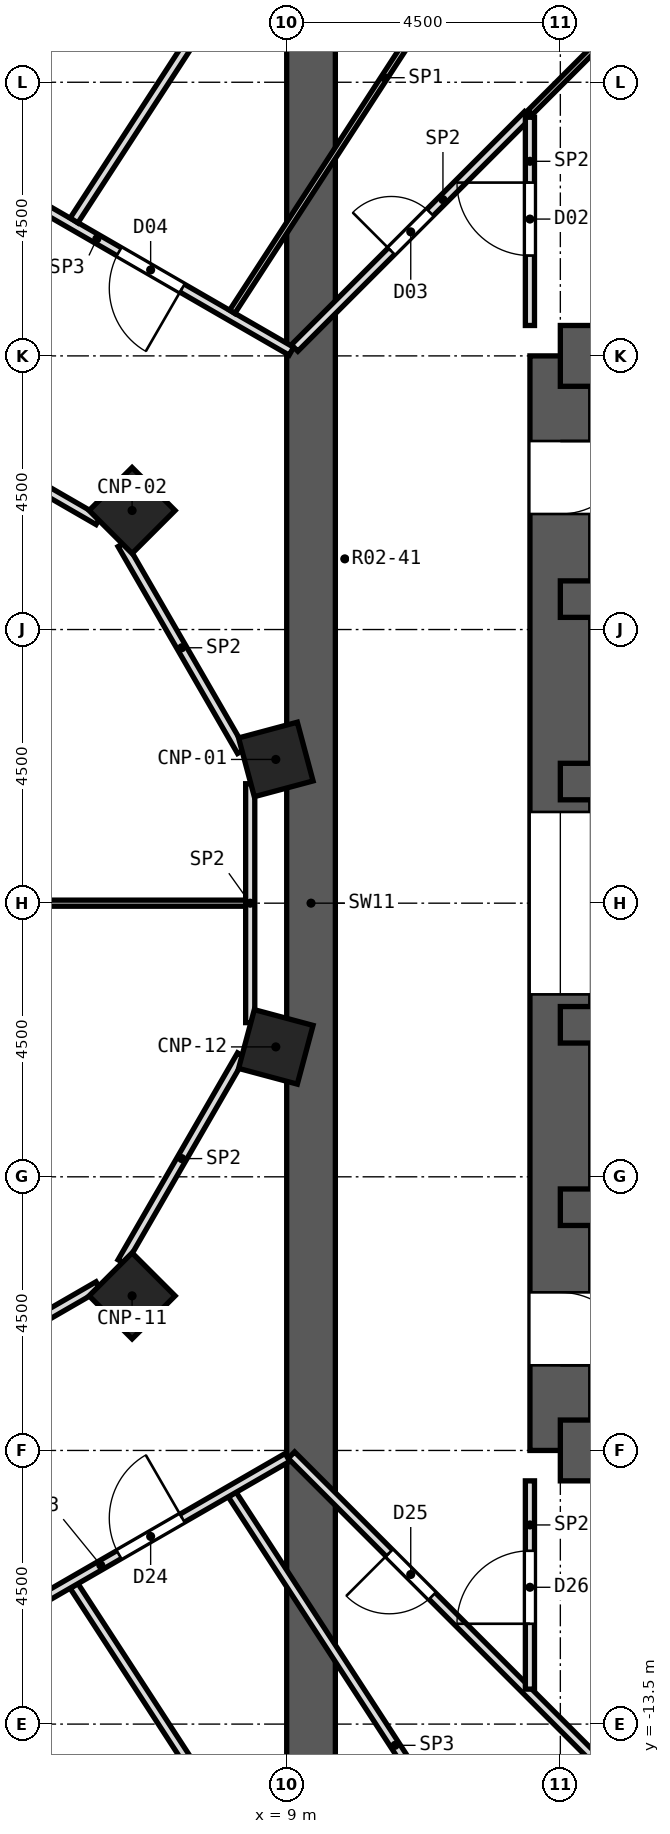
"""IFC4 building model, lengths in metres.
Left out: names, types, materials, properties, quantities, classifications, styles, units other than length and angle.
Written with IfcOpenShell. Run it as: python <this file> out.ifc"""

import sys

from ifc_helpers import new_model, si_unit, direction, frame, frame_2d, origin, origin_2d, place, context, subcontext, project, spatial, rectangle, extrude, element, fill, save


model = new_model("IFC4")
c1 = context("Model", 3, precision=1e-05, world=origin(), true_north=direction((0.0, 1.0)))
c2 = subcontext(c1, "Body", "Model", "MODEL_VIEW")
j1 = project(units=[si_unit("LENGTHUNIT", "METRE"), si_unit("PLANEANGLEUNIT", "RADIAN")], contexts=[c1])
p1 = place(None, origin())
s1 = spatial("IfcSite", under=j1, at=p1, CompositionType="ELEMENT")
p2 = place(p1, origin())
s2 = spatial("IfcBuilding", under=s1, at=p2, CompositionType="ELEMENT")
p3 = place(p2, frame((0.0, 0.0, -4.5)))
s3 = spatial("IfcBuildingStorey", under=s2, at=p3, CompositionType="ELEMENT", Elevation=-4.5)
for number, where, z_axis, x_axis in (
    (1, (8.821, 2.364, 0.0), (0.0, 0.0, 1.0), (0.966, 0.259, 0.0)),
    (2, (6.458, 6.458, 0.0), (0.0, 0.0, 1.0), (0.707, 0.707, 0.0)),
    (3, (6.458, -6.458, 0.0), (0.0, 0.0, 1.0), (0.707, -0.707, 0.0)),
    (4, (8.821, -2.364, 0.0), (0.0, 0.0, 1.0), (0.966, -0.259, 0.0)),
):
    element("IfcColumn", number, at=place(p3, frame(where, z_axis=z_axis, x_axis=x_axis)), inside=s3, PredefinedType="COLUMN", context=c2, shape_type="SweptSolid", body=[
        extrude(rectangle(XDim=1.0, YDim=1.0, at=origin_2d()), origin(), (0.0, 0.0, 1.0), 4.5),
    ])
p4 = place(p3, frame((13.5, -9.0, 0.0), z_axis=(0.0, 0.0, 1.0), x_axis=(0.0, 1.0, 0.0)))
e5 = element("IfcWall", 5, at=p4, inside=s3, PredefinedType="SHEAR", context=c2, shape_type="SweptSolid", body=[
    extrude(rectangle(XDim=18.0, YDim=1.0, at=frame_2d((9.0, 0.0))), origin(), (0.0, 0.0, 1.0), 4.5),
])
p5 = place(p4, frame((15.4, 0.0, 0.0)))
e6 = element("IfcOpeningElement", 6, at=p5, cuts=e5, PredefinedType="OPENING", context=c2, shape_type="SweptSolid", body=[
    extrude(rectangle(XDim=1.2, YDim=2.1, at=frame_2d((0.6, 1.05))), frame((0.0, 0.512, 0.0), z_axis=(0.0, -1.0, 0.0), x_axis=(1.0, 0.0, 0.0)), (0.0, 0.0, 1.0), 1.024),
])
p6 = place(p4, frame((1.4, 0.0, 0.0)))
e7 = element("IfcOpeningElement", 7, at=p6, cuts=e5, PredefinedType="OPENING", context=c2, shape_type="SweptSolid", body=[
    extrude(rectangle(XDim=1.2, YDim=2.1, at=frame_2d((0.6, 1.05))), frame((0.0, 0.512, 0.0), z_axis=(0.0, -1.0, 0.0), x_axis=(1.0, 0.0, 0.0)), (0.0, 0.0, 1.0), 1.024),
])
p7 = place(p4, frame((7.5, 0.0, 0.0)))
e8 = element("IfcOpeningElement", 8, at=p7, cuts=e5, PredefinedType="OPENING", context=c2, shape_type="SweptSolid", body=[
    extrude(rectangle(XDim=3.0, YDim=2.4, at=frame_2d((1.5, 1.2))), frame((0.0, 0.512, 0.0), z_axis=(0.0, -1.0, 0.0), x_axis=(1.0, 0.0, 0.0)), (0.0, 0.0, 1.0), 1.024),
])
for number, where, z_axis, x_axis in (
    (9, (13.5, 9.0, 0.0), (0.0, 0.0, 1.0), (1.0, 0.0, 0.0)),
    (10, (13.5, -9.0, 0.0), (0.0, 0.0, 1.0), (1.0, 0.0, 0.0)),
):
    element("IfcWall", number, at=place(p3, frame(where, z_axis=z_axis, x_axis=x_axis)), inside=s3, PredefinedType="SHEAR", context=c2, shape_type="SweptSolid", body=[
        extrude(rectangle(XDim=12.4, YDim=1.0, at=frame_2d((6.2, 0.0))), origin(), (0.0, 0.0, 1.0), 4.5),
    ])
p8 = place(p3, frame((13.5, 5.0, 0.0), z_axis=(0.0, 0.0, 1.0), x_axis=(1.0, 0.0, 0.0)))
e11 = element("IfcWall", 11, at=p8, inside=s3, PredefinedType="SHEAR", context=c2, shape_type="SweptSolid", body=[
    extrude(rectangle(XDim=12.4, YDim=0.6, at=frame_2d((6.2, 0.0))), origin(), (0.0, 0.0, 1.0), 4.5),
])
p9 = place(p8, frame((10.31, 0.0, 0.0)))
e12 = element("IfcOpeningElement", 12, at=p9, cuts=e11, PredefinedType="OPENING", context=c2, shape_type="SweptSolid", body=[
    extrude(rectangle(XDim=0.9, YDim=2.1, at=frame_2d((0.45, 1.05))), frame((0.0, 0.312, 0.0), z_axis=(0.0, -1.0, 0.0), x_axis=(1.0, 0.0, 0.0)), (0.0, 0.0, 1.0), 0.624),
])
p10 = place(p3, frame((13.5, -5.0, 0.0), z_axis=(0.0, 0.0, 1.0), x_axis=(1.0, 0.0, 0.0)))
e13 = element("IfcWall", 13, at=p10, inside=s3, PredefinedType="SHEAR", context=c2, shape_type="SweptSolid", body=[
    extrude(rectangle(XDim=12.4, YDim=0.6, at=frame_2d((6.2, 0.0))), origin(), (0.0, 0.0, 1.0), 4.5),
])
p11 = place(p10, frame((10.716, 0.0, 0.0)))
e14 = element("IfcOpeningElement", 14, at=p11, cuts=e13, PredefinedType="OPENING", context=c2, shape_type="SweptSolid", body=[
    extrude(rectangle(XDim=0.9, YDim=2.1, at=frame_2d((0.45, 1.05))), frame((0.0, 0.312, 0.0), z_axis=(0.0, -1.0, 0.0), x_axis=(1.0, 0.0, 0.0)), (0.0, 0.0, 1.0), 0.624),
])
p12 = place(p10, frame((0.6, 0.0, 0.0)))
e15 = element("IfcOpeningElement", 15, at=p12, cuts=e13, PredefinedType="OPENING", context=c2, shape_type="SweptSolid", body=[
    extrude(rectangle(XDim=1.1, YDim=2.1, at=frame_2d((0.55, 1.05))), frame((0.0, 0.312, 0.0), z_axis=(0.0, -1.0, 0.0), x_axis=(1.0, 0.0, 0.0)), (0.0, 0.0, 1.0), 0.624),
])
p13 = place(p3, frame((13.5, 2.0, 0.0), z_axis=(0.0, 0.0, 1.0), x_axis=(1.0, 0.0, 0.0)))
e16 = element("IfcWall", 16, at=p13, inside=s3, PredefinedType="SHEAR", context=c2, shape_type="SweptSolid", body=[
    extrude(rectangle(XDim=12.4, YDim=0.6, at=frame_2d((6.2, 0.0))), origin(), (0.0, 0.0, 1.0), 4.5),
])
p14 = place(p13, frame((1.076, 0.0, 0.0)))
e17 = element("IfcOpeningElement", 17, at=p14, cuts=e16, PredefinedType="OPENING", context=c2, shape_type="SweptSolid", body=[
    extrude(rectangle(XDim=0.9, YDim=2.1, at=frame_2d((0.45, 1.05))), frame((0.0, 0.312, 0.0), z_axis=(0.0, -1.0, 0.0), x_axis=(1.0, 0.0, 0.0)), (0.0, 0.0, 1.0), 0.624),
])
p15 = place(p13, frame((3.196, 0.0, 0.0)))
e18 = element("IfcOpeningElement", 18, at=p15, cuts=e16, PredefinedType="OPENING", context=c2, shape_type="SweptSolid", body=[
    extrude(rectangle(XDim=0.9, YDim=2.1, at=frame_2d((0.45, 1.05))), frame((0.0, 0.312, 0.0), z_axis=(0.0, -1.0, 0.0), x_axis=(1.0, 0.0, 0.0)), (0.0, 0.0, 1.0), 0.624),
])
p16 = place(p13, frame((5.59, 0.0, 0.0)))
e19 = element("IfcOpeningElement", 19, at=p16, cuts=e16, PredefinedType="OPENING", context=c2, shape_type="SweptSolid", body=[
    extrude(rectangle(XDim=0.9, YDim=2.1, at=frame_2d((0.45, 1.05))), frame((0.0, 0.312, 0.0), z_axis=(0.0, -1.0, 0.0), x_axis=(1.0, 0.0, 0.0)), (0.0, 0.0, 1.0), 0.624),
])
p17 = place(p13, frame((10.31, 0.0, 0.0)))
e20 = element("IfcOpeningElement", 20, at=p17, cuts=e16, PredefinedType="OPENING", context=c2, shape_type="SweptSolid", body=[
    extrude(rectangle(XDim=0.9, YDim=2.1, at=frame_2d((0.45, 1.05))), frame((0.0, 0.312, 0.0), z_axis=(0.0, -1.0, 0.0), x_axis=(1.0, 0.0, 0.0)), (0.0, 0.0, 1.0), 0.624),
])
p18 = place(p3, frame((13.5, -2.0, 0.0), z_axis=(0.0, 0.0, 1.0), x_axis=(1.0, 0.0, 0.0)))
e21 = element("IfcWall", 21, at=p18, inside=s3, PredefinedType="SHEAR", context=c2, shape_type="SweptSolid", body=[
    extrude(rectangle(XDim=12.4, YDim=0.6, at=frame_2d((6.2, 0.0))), origin(), (0.0, 0.0, 1.0), 4.5),
])
p19 = place(p18, frame((1.265, 0.0, 0.0)))
e22 = element("IfcOpeningElement", 22, at=p19, cuts=e21, PredefinedType="OPENING", context=c2, shape_type="SweptSolid", body=[
    extrude(rectangle(XDim=1.0, YDim=2.1, at=frame_2d((0.5, 1.05))), frame((0.0, 0.312, 0.0), z_axis=(0.0, -1.0, 0.0), x_axis=(1.0, 0.0, 0.0)), (0.0, 0.0, 1.0), 0.624),
])
p20 = place(p18, frame((10.31, 0.0, 0.0)))
e23 = element("IfcOpeningElement", 23, at=p20, cuts=e21, PredefinedType="OPENING", context=c2, shape_type="SweptSolid", body=[
    extrude(rectangle(XDim=0.9, YDim=2.1, at=frame_2d((0.45, 1.05))), frame((0.0, 0.312, 0.0), z_axis=(0.0, -1.0, 0.0), x_axis=(1.0, 0.0, 0.0)), (0.0, 0.0, 1.0), 0.624),
])
p21 = place(p3, frame((9.4, -27.077, 0.0), z_axis=(0.0, 0.0, 1.0), x_axis=(0.0, 1.0, 0.0)))
e24 = element("IfcWall", 24, at=p21, inside=s3, PredefinedType="SHEAR", context=c2, shape_type="SweptSolid", body=[
    extrude(rectangle(XDim=54.154, YDim=0.8, at=frame_2d((27.077, 0.0))), origin(), (0.0, 0.0, 1.0), 4.5),
])
p22 = place(p3, frame((3.323, -12.4, 0.0), z_axis=(0.0, 0.0, 1.0), x_axis=(0.258774542154, -0.965937749719, 0.0)))
e25 = element("IfcWall", 25, at=p22, inside=s3, PredefinedType="PARTITIONING", context=c2, shape_type="SweptSolid", body=[
    extrude(rectangle(XDim=14.703, YDim=0.15, at=frame_2d((7.351, 0.0))), origin(), (0.0, 0.0, 1.0), 3.95),
])
p23 = place(p3, frame((6.292, 5.902, 0.0), z_axis=(0.0, 0.0, 1.0), x_axis=(0.500061252887, -0.865990036525, 0.0)))
e26 = element("IfcWall", 26, at=p23, inside=s3, PredefinedType="PARTITIONING", context=c2, shape_type="SweptSolid", body=[
    extrude(rectangle(XDim=3.93, YDim=0.15, at=frame_2d((1.965, 0.0))), origin(), (0.0, 0.0, 1.0), 3.95),
])
p24 = place(p3, frame((5.503, -11.228, 0.0), z_axis=(0.0, 0.0, 1.0), x_axis=(0.544658291874, -0.838658062081, 0.0)))
e27 = element("IfcWall", 27, at=p24, inside=s3, PredefinedType="PARTITIONING", context=c2, shape_type="SweptSolid", body=[
    extrude(rectangle(XDim=9.959, YDim=0.15, at=frame_2d((4.979, 0.0))), origin(), (0.0, 0.0, 1.0), 3.95),
])
p25 = place(p3, frame((8.104, -9.725, 0.0), z_axis=(0.0, 0.0, 1.0), x_axis=(0.544634017979, -0.838673826026, 0.0)))
e28 = element("IfcWall", 28, at=p25, inside=s3, PredefinedType="PARTITIONING", context=c2, shape_type="SweptSolid", body=[
    extrude(rectangle(XDim=9.834, YDim=0.15, at=frame_2d((4.917, 0.0))), origin(), (0.0, 0.0, 1.0), 3.95),
])
p26 = place(p3, frame((9.077, -9.077, 0.0), z_axis=(0.0, 0.0, 1.0), x_axis=(0.707106781187, -0.707106781187, 0.0)))
e29 = element("IfcWall", 29, at=p26, inside=s3, PredefinedType="PARTITIONING", context=c2, shape_type="SweptSolid", body=[
    extrude(rectangle(XDim=14.703, YDim=0.15, at=frame_2d((7.352, 0.0))), origin(), (0.0, 0.0, 1.0), 3.95),
])
p27 = place(p26, frame((2.276, 0.0, 0.0)))
e30 = element("IfcOpeningElement", 30, at=p27, cuts=e29, PredefinedType="OPENING", context=c2, shape_type="SweptSolid", body=[
    extrude(rectangle(XDim=1.0, YDim=2.1, at=frame_2d((0.5, 1.05))), frame((0.0, 0.087, 0.0), z_axis=(0.0, -1.0, 0.0), x_axis=(1.0, 0.0, 0.0)), (0.0, 0.0, 1.0), 0.174),
])
p28 = place(p3, frame((2.499, 8.257, 0.0), z_axis=(0.0, 0.0, 1.0), x_axis=(0.865990036525, -0.500061252887, 0.0)))
e31 = element("IfcWall", 31, at=p28, inside=s3, PredefinedType="PARTITIONING", context=c2, shape_type="SweptSolid", body=[
    extrude(rectangle(XDim=3.93, YDim=0.15, at=frame_2d((1.965, 0.0))), origin(), (0.0, 0.0, 1.0), 3.95),
])
p29 = place(p3, frame((3.323, 12.4, 0.0), z_axis=(0.0, 0.0, 1.0), x_axis=(0.865961614908, -0.500110469302, 0.0)))
e32 = element("IfcWall", 32, at=p29, inside=s3, PredefinedType="PARTITIONING", context=c2, shape_type="SweptSolid", body=[
    extrude(rectangle(XDim=6.645, YDim=0.15, at=frame_2d((3.322, 0.0))), origin(), (0.0, 0.0, 1.0), 3.95),
])
p30 = place(p29, frame((3.372, 0.0, 0.0)))
e33 = element("IfcOpeningElement", 33, at=p30, cuts=e32, PredefinedType="OPENING", context=c2, shape_type="SweptSolid", body=[
    extrude(rectangle(XDim=1.2, YDim=2.1, at=frame_2d((0.6, 1.05))), frame((0.0, 0.087, 0.0), z_axis=(0.0, -1.0, 0.0), x_axis=(1.0, 0.0, 0.0)), (0.0, 0.0, 1.0), 0.174),
])
p31 = place(p29, frame((0.735, 0.0, 0.0)))
e34 = element("IfcOpeningElement", 34, at=p31, cuts=e32, PredefinedType="OPENING", context=c2, shape_type="SweptSolid", body=[
    extrude(rectangle(XDim=1.0, YDim=2.1, at=frame_2d((0.5, 1.05))), frame((0.0, 0.087, 0.0), z_axis=(0.0, -1.0, 0.0), x_axis=(1.0, 0.0, 0.0)), (0.0, 0.0, 1.0), 0.174),
])
p32 = place(p3, frame((-8.325, 0.0, 0.0), z_axis=(0.0, 0.0, 1.0), x_axis=(1.0, 0.0, 0.0)))
e35 = element("IfcWall", 35, at=p32, inside=s3, PredefinedType="PARTITIONING", context=c2, shape_type="SweptSolid", body=[
    extrude(rectangle(XDim=16.65, YDim=0.1, at=frame_2d((8.325, 0.0))), origin(), (0.0, 0.0, 1.0), 3.95),
])
p33 = place(p3, frame((3.388, -12.363, 0.0), z_axis=(0.0, 0.0, 1.0), x_axis=(0.865967095912, 0.5001009786, 0.0)))
e36 = element("IfcWall", 36, at=p33, inside=s3, PredefinedType="PARTITIONING", context=c2, shape_type="SweptSolid", body=[
    extrude(rectangle(XDim=6.495, YDim=0.15, at=frame_2d((3.248, 0.0))), origin(), (0.0, 0.0, 1.0), 3.95),
])
p34 = place(p33, frame((0.66, 0.0, 0.0)))
e37 = element("IfcOpeningElement", 37, at=p34, cuts=e36, PredefinedType="OPENING", context=c2, shape_type="SweptSolid", body=[
    extrude(rectangle(XDim=1.0, YDim=2.1, at=frame_2d((0.5, 1.05))), frame((0.0, 0.087, 0.0), z_axis=(0.0, -1.0, 0.0), x_axis=(1.0, 0.0, 0.0)), (0.0, 0.0, 1.0), 0.174),
])
p35 = place(p33, frame((3.297, 0.0, 0.0)))
e38 = element("IfcOpeningElement", 38, at=p35, cuts=e36, PredefinedType="OPENING", context=c2, shape_type="SweptSolid", body=[
    extrude(rectangle(XDim=1.2, YDim=2.1, at=frame_2d((0.6, 1.05))), frame((0.0, 0.087, 0.0), z_axis=(0.0, -1.0, 0.0), x_axis=(1.0, 0.0, 0.0)), (0.0, 0.0, 1.0), 0.174),
])
p36 = place(p3, frame((2.499, -8.257, 0.0), z_axis=(0.0, 0.0, 1.0), x_axis=(0.865990036525, 0.500061252887, 0.0)))
e39 = element("IfcWall", 39, at=p36, inside=s3, PredefinedType="PARTITIONING", context=c2, shape_type="SweptSolid", body=[
    extrude(rectangle(XDim=3.93, YDim=0.15, at=frame_2d((1.965, 0.0))), origin(), (0.0, 0.0, 1.0), 3.95),
])
p37 = place(p3, frame((13.0, 13.0, 0.0), z_axis=(0.0, 0.0, 1.0), x_axis=(0.707106781187, 0.707106781187, 0.0)))
e40 = element("IfcWall", 40, at=p37, inside=s3, PredefinedType="PARTITIONING", context=c2, shape_type="SweptSolid", body=[
    extrude(rectangle(XDim=9.155, YDim=0.1, at=frame_2d((4.578, 0.0))), origin(), (0.0, 0.0, 1.0), 3.95),
])
p38 = place(p3, frame((9.13, 9.13, 0.0), z_axis=(0.0, 0.0, 1.0), x_axis=(0.707106781187, 0.707106781187, 0.0)))
e41 = element("IfcWall", 41, at=p38, inside=s3, PredefinedType="PARTITIONING", context=c2, shape_type="SweptSolid", body=[
    extrude(rectangle(XDim=5.423, YDim=0.15, at=frame_2d((2.711, 0.0))), origin(), (0.0, 0.0, 1.0), 3.95),
])
p39 = place(p38, frame((2.251, 0.0, 0.0)))
e42 = element("IfcOpeningElement", 42, at=p39, cuts=e41, PredefinedType="OPENING", context=c2, shape_type="SweptSolid", body=[
    extrude(rectangle(XDim=0.9, YDim=2.1, at=frame_2d((0.45, 1.05))), frame((0.0, 0.087, 0.0), z_axis=(0.0, -1.0, 0.0), x_axis=(1.0, 0.0, 0.0)), (0.0, 0.0, 1.0), 0.174),
])
p40 = place(p3, frame((8.104, 9.725, 0.0), z_axis=(0.0, 0.0, 1.0), x_axis=(0.544649902599, 0.838663510354, 0.0)))
e43 = element("IfcWall", 43, at=p40, inside=s3, PredefinedType="PARTITIONING", context=c2, shape_type="SweptSolid", body=[
    extrude(rectangle(XDim=9.18, YDim=0.1, at=frame_2d((4.59, 0.0))), origin(), (0.0, 0.0, 1.0), 3.95),
])
p41 = place(p3, frame((5.503, 11.228, 0.0), z_axis=(0.0, 0.0, 1.0), x_axis=(0.5446582962, 0.838658059271, 0.0)))
e44 = element("IfcWall", 44, at=p41, inside=s3, PredefinedType="PARTITIONING", context=c2, shape_type="SweptSolid", body=[
    extrude(rectangle(XDim=9.283, YDim=0.15, at=frame_2d((4.642, 0.0))), origin(), (0.0, 0.0, 1.0), 3.95),
])
p42 = place(p3, frame((6.292, -5.902, 0.0), z_axis=(0.0, 0.0, 1.0), x_axis=(0.500061252887, 0.865990036525, 0.0)))
e45 = element("IfcWall", 45, at=p42, inside=s3, PredefinedType="PARTITIONING", context=c2, shape_type="SweptSolid", body=[
    extrude(rectangle(XDim=3.93, YDim=0.15, at=frame_2d((1.965, 0.0))), origin(), (0.0, 0.0, 1.0), 3.95),
])
p43 = place(p3, frame((3.342, 12.472, 0.0), z_axis=(0.0, 0.0, 1.0), x_axis=(0.258789007971, 0.965933874214, 0.0)))
e46 = element("IfcWall", 46, at=p43, inside=s3, PredefinedType="PARTITIONING", context=c2, shape_type="SweptSolid", body=[
    extrude(rectangle(XDim=8.916, YDim=0.15, at=frame_2d((4.458, 0.0))), origin(), (0.0, 0.0, 1.0), 3.95),
])
p44 = place(p3, frame((13.0, -12.925, 0.0), z_axis=(0.0, 0.0, 1.0), x_axis=(0.0, 1.0, 0.0)))
e47 = element("IfcWall", 47, at=p44, inside=s3, PredefinedType="PARTITIONING", context=c2, shape_type="SweptSolid", body=[
    extrude(rectangle(XDim=3.425, YDim=0.15, at=frame_2d((1.712, 0.0))), origin(), (0.0, 0.0, 1.0), 3.95),
])
p45 = place(p44, frame((1.075, 0.0, 0.0)))
e48 = element("IfcOpeningElement", 48, at=p45, cuts=e47, PredefinedType="OPENING", context=c2, shape_type="SweptSolid", body=[
    extrude(rectangle(XDim=1.2, YDim=2.1, at=frame_2d((0.6, 1.05))), frame((0.0, 0.087, 0.0), z_axis=(0.0, -1.0, 0.0), x_axis=(1.0, 0.0, 0.0)), (0.0, 0.0, 1.0), 0.174),
])
p46 = place(p3, frame((13.0, 9.5, 0.0), z_axis=(0.0, 0.0, 1.0), x_axis=(0.0, 1.0, 0.0)))
e49 = element("IfcWall", 49, at=p46, inside=s3, PredefinedType="PARTITIONING", context=c2, shape_type="SweptSolid", body=[
    extrude(rectangle(XDim=3.425, YDim=0.15, at=frame_2d((1.712, 0.0))), origin(), (0.0, 0.0, 1.0), 3.95),
])
p47 = place(p46, frame((1.15, 0.0, 0.0)))
e50 = element("IfcOpeningElement", 50, at=p47, cuts=e49, PredefinedType="OPENING", context=c2, shape_type="SweptSolid", body=[
    extrude(rectangle(XDim=1.2, YDim=2.1, at=frame_2d((0.6, 1.05))), frame((0.0, 0.087, 0.0), z_axis=(0.0, -1.0, 0.0), x_axis=(1.0, 0.0, 0.0)), (0.0, 0.0, 1.0), 0.174),
])
p48 = place(p3, frame((8.4, -1.964, 0.0), z_axis=(0.0, 0.0, 1.0), x_axis=(0.0, 1.0, 0.0)))
e51 = element("IfcWall", 51, at=p48, inside=s3, PredefinedType="PARTITIONING", context=c2, shape_type="SweptSolid", body=[
    extrude(rectangle(XDim=3.929, YDim=0.15, at=frame_2d((1.964, 0.0))), origin(), (0.0, 0.0, 1.0), 3.95),
])
p49 = place(p47, origin())
e52 = element("IfcDoor", 52, at=p49, inside=s3, OperationType="SINGLE_SWING_RIGHT", PredefinedType="DOOR", context=c2, shape_type="SweptSolid", body=[
    extrude(rectangle(XDim=1.2, YDim=2.1, at=frame_2d((0.6, 1.05))), frame((0.0, 0.025, 0.0), z_axis=(0.0, -1.0, 0.0), x_axis=(1.0, 0.0, 0.0)), (0.0, 0.0, 1.0), 0.05),
])
fill(e50, e52)
p50 = place(p39, origin())
e53 = element("IfcDoor", 53, at=p50, inside=s3, OperationType="SINGLE_SWING_LEFT", PredefinedType="DOOR", context=c2, shape_type="SweptSolid", body=[
    extrude(rectangle(XDim=0.9, YDim=2.1, at=frame_2d((0.45, 1.05))), frame((0.0, 0.025, 0.0), z_axis=(0.0, -1.0, 0.0), x_axis=(1.0, 0.0, 0.0)), (0.0, 0.0, 1.0), 0.05),
])
fill(e42, e53)
p51 = place(p30, frame((1.2, 0.0, 0.0), z_axis=(0.0, 0.0, 1.0), x_axis=(-1.0, 0.0, 0.0)))
e54 = element("IfcDoor", 54, at=p51, inside=s3, OperationType="SINGLE_SWING_LEFT", PredefinedType="DOOR", context=c2, shape_type="SweptSolid", body=[
    extrude(rectangle(XDim=1.2, YDim=2.1, at=frame_2d((0.6, 1.05))), frame((0.0, 0.025, 0.0), z_axis=(0.0, -1.0, 0.0), x_axis=(1.0, 0.0, 0.0)), (0.0, 0.0, 1.0), 0.05),
])
fill(e33, e54)
p52 = place(p35, origin())
e55 = element("IfcDoor", 55, at=p52, inside=s3, OperationType="SINGLE_SWING_RIGHT", PredefinedType="DOOR", context=c2, shape_type="SweptSolid", body=[
    extrude(rectangle(XDim=1.2, YDim=2.1, at=frame_2d((0.6, 1.05))), frame((0.0, 0.025, 0.0), z_axis=(0.0, -1.0, 0.0), x_axis=(1.0, 0.0, 0.0)), (0.0, 0.0, 1.0), 0.05),
])
fill(e38, e55)
p53 = place(p27, frame((1.0, 0.0, 0.0), z_axis=(0.0, 0.0, 1.0), x_axis=(-1.0, 0.0, 0.0)))
e56 = element("IfcDoor", 56, at=p53, inside=s3, OperationType="SINGLE_SWING_RIGHT", PredefinedType="DOOR", context=c2, shape_type="SweptSolid", body=[
    extrude(rectangle(XDim=1.0, YDim=2.1, at=frame_2d((0.5, 1.05))), frame((0.0, 0.025, 0.0), z_axis=(0.0, -1.0, 0.0), x_axis=(1.0, 0.0, 0.0)), (0.0, 0.0, 1.0), 0.05),
])
fill(e30, e56)
p54 = place(p45, origin())
e57 = element("IfcDoor", 57, at=p54, inside=s3, OperationType="SINGLE_SWING_LEFT", PredefinedType="DOOR", context=c2, shape_type="SweptSolid", body=[
    extrude(rectangle(XDim=1.2, YDim=2.1, at=frame_2d((0.6, 1.05))), frame((0.0, 0.025, 0.0), z_axis=(0.0, -1.0, 0.0), x_axis=(1.0, 0.0, 0.0)), (0.0, 0.0, 1.0), 0.05),
])
fill(e48, e57)
p55 = place(p5, frame((1.2, 0.0, 0.0), z_axis=(0.0, 0.0, 1.0), x_axis=(-1.0, 0.0, 0.0)))
e58 = element("IfcDoor", 58, at=p55, inside=s3, OperationType="SINGLE_SWING_LEFT", PredefinedType="DOOR", context=c2, shape_type="SweptSolid", body=[
    extrude(rectangle(XDim=1.2, YDim=2.1, at=frame_2d((0.6, 1.05))), frame((0.0, 0.025, 0.0), z_axis=(0.0, -1.0, 0.0), x_axis=(1.0, 0.0, 0.0)), (0.0, 0.0, 1.0), 0.05),
])
fill(e6, e58)
p56 = place(p6, frame((1.2, 0.0, 0.0), z_axis=(0.0, 0.0, 1.0), x_axis=(-1.0, 0.0, 0.0)))
e59 = element("IfcDoor", 59, at=p56, inside=s3, OperationType="SINGLE_SWING_RIGHT", PredefinedType="DOOR", context=c2, shape_type="SweptSolid", body=[
    extrude(rectangle(XDim=1.2, YDim=2.1, at=frame_2d((0.6, 1.05))), frame((0.0, 0.025, 0.0), z_axis=(0.0, -1.0, 0.0), x_axis=(1.0, 0.0, 0.0)), (0.0, 0.0, 1.0), 0.05),
])
fill(e7, e59)
p57 = place(p7, origin())
e60 = element("IfcDoor", 60, at=p57, inside=s3, OperationType="DOUBLE_DOOR_SLIDING", PredefinedType="DOOR", context=c2, shape_type="SweptSolid", body=[
    extrude(rectangle(XDim=3.0, YDim=2.4, at=frame_2d((1.5, 1.2))), frame((0.0, 0.025, 0.0), z_axis=(0.0, -1.0, 0.0), x_axis=(1.0, 0.0, 0.0)), (0.0, 0.0, 1.0), 0.05),
])
fill(e8, e60)
save(model, sys.argv[1])
